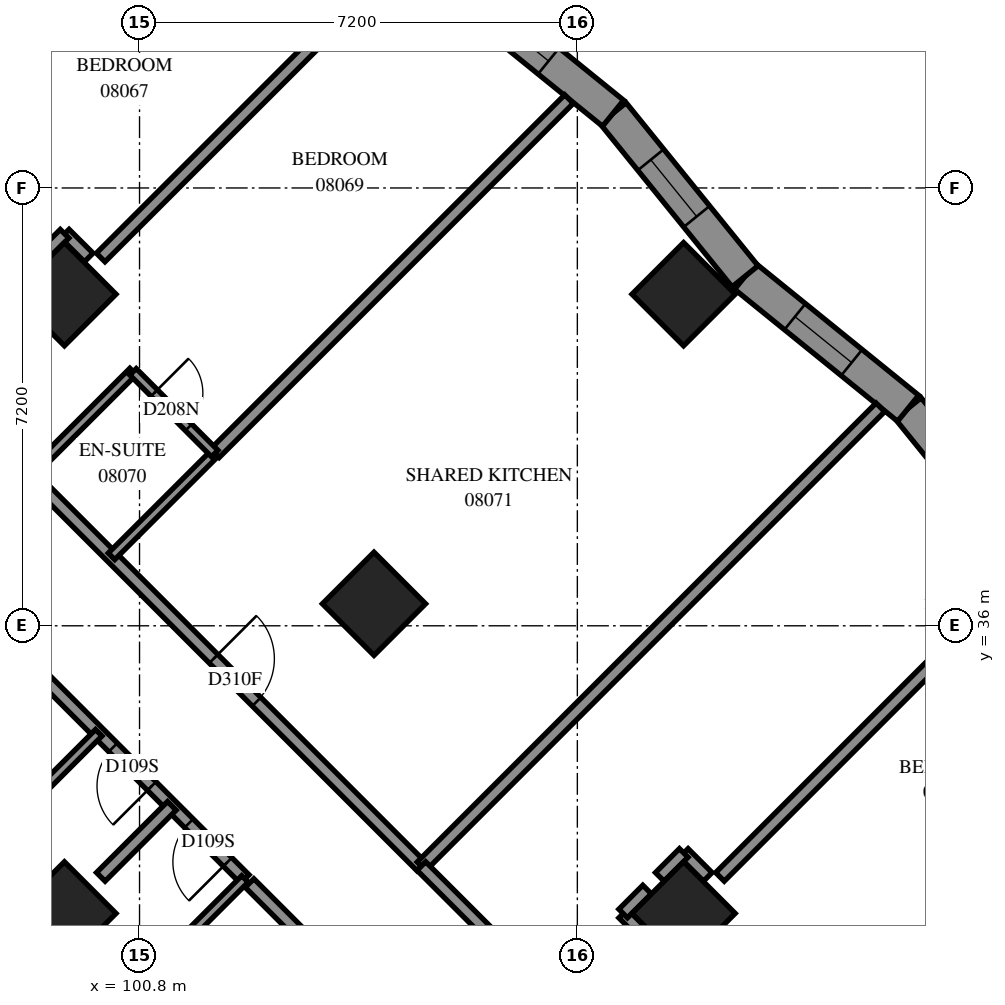
"""IFC4 building model, lengths in metres.
Left out: names, types, materials, properties, quantities, classifications, styles, units other than length and angle.
Written with IfcOpenShell. Run it as: python <this file> out.ifc"""

import sys

from ifc_helpers import new_model, si_unit, direction, frame, frame_2d, origin, origin_2d, place, context, subcontext, project, spatial, polyline, rectangle, outline, extrude, element, fill, save


model = new_model("IFC4")
c1 = context("Model", 3, precision=1e-05, world=origin(), true_north=direction((0.0, 1.0)))
c2 = subcontext(c1, "Body", "Model", "MODEL_VIEW")
j1 = project(units=[si_unit("LENGTHUNIT", "METRE"), si_unit("PLANEANGLEUNIT", "RADIAN")], contexts=[c1])
p1 = place(None, origin())
s1 = spatial("IfcSite", under=j1, at=p1, CompositionType="ELEMENT")
p2 = place(p1, origin())
s2 = spatial("IfcBuilding", under=s1, at=p2, CompositionType="ELEMENT")
p3 = place(p2, frame((0.0, 0.0, 33.8)))
s3 = spatial("IfcBuildingStorey", under=s2, at=p3, CompositionType="ELEMENT", Elevation=33.8)
for number, where, z_axis, x_axis in (
    (1, (99.565, 41.453, 0.0), (0.0, 0.0, 1.0), (0.707, -0.707, 0.0)),
    (2, (109.747, 41.453, 0.0), (0.0, 0.0, 1.0), (0.707, -0.707, 0.0)),
    (3, (104.656, 36.362, 0.0), (0.0, 0.0, 1.0), (0.707, -0.707, 0.0)),
    (4, (99.565, 31.271, 0.0), (0.0, 0.0, 1.0), (0.707, -0.707, 0.0)),
    (5, (109.747, 31.271, 0.0), (0.0, 0.0, 1.0), (0.707, -0.707, 0.0)),
):
    element("IfcColumn", number, at=place(p3, frame(where, z_axis=z_axis, x_axis=x_axis)), inside=s3, PredefinedType="COLUMN", context=c2, shape_type="SweptSolid", body=[
        extrude(rectangle(XDim=1.2, YDim=1.2, at=origin_2d()), origin(), (0.0, 0.0, 1.0), 3.1),
    ])
p4 = place(p3, frame((115.626, 36.877, 0.0), z_axis=(0.0, 0.0, 1.0), x_axis=(-0.6292379801, 0.7772126893, 0.0)))
e6 = element("IfcWall", 6, at=p4, inside=s3, PredefinedType="SOLIDWALL", context=c2, shape_type="SweptSolid", body=[
    extrude(outline(polyline([(0.053, -0.275), (3.502, -0.275), (3.445, 0.275), (-0.053, 0.275), (0.053, -0.275)])), origin(), (0.0, 0.0, 1.0), 3.1),
])
p5 = place(p4, frame((1.122, 0.0, 0.5)))
e7 = element("IfcOpeningElement", 7, at=p5, cuts=e6, PredefinedType="OPENING", context=c2, shape_type="SweptSolid", body=[
    extrude(rectangle(XDim=1.2, YDim=2.45, at=frame_2d((0.6, 1.225))), frame((0.0, 0.285, 0.0), z_axis=(0.0, -1.0, 0.0), x_axis=(1.0, 0.0, 0.0)), (0.0, 0.0, 1.0), 0.57),
])
p6 = place(p3, frame((113.44, 39.577, 0.0), z_axis=(0.0, 0.0, 1.0), x_axis=(-0.7772131435, 0.6292374191, 0.0)))
e8 = element("IfcWall", 8, at=p6, inside=s3, PredefinedType="SOLIDWALL", context=c2, shape_type="SweptSolid", body=[
    extrude(outline(polyline([(-0.029, -0.275), (3.421, -0.275), (3.479, 0.275), (0.029, 0.275), (-0.029, -0.275)])), origin(), (0.0, 0.0, 1.0), 3.1),
])
p7 = place(p6, frame((1.195, 0.0, 0.5)))
e9 = element("IfcOpeningElement", 9, at=p7, cuts=e8, PredefinedType="OPENING", context=c2, shape_type="SweptSolid", body=[
    extrude(rectangle(XDim=1.2, YDim=2.45, at=frame_2d((0.6, 1.225))), frame((0.0, 0.285, 0.0), z_axis=(0.0, -1.0, 0.0), x_axis=(1.0, 0.0, 0.0)), (0.0, 0.0, 1.0), 0.57),
])
p8 = place(p3, frame((110.759, 41.747, 0.0), z_axis=(0.0, 0.0, 1.0), x_axis=(-0.6292199091, 0.7772273194, 0.0)))
e10 = element("IfcWall", 10, at=p8, inside=s3, PredefinedType="SOLIDWALL", context=c2, shape_type="SweptSolid", body=[
    extrude(outline(polyline([(0.029, -0.275), (3.479, -0.275), (3.421, 0.275), (-0.029, 0.275), (0.029, -0.275)])), origin(), (0.0, 0.0, 1.0), 3.1),
])
p9 = place(p8, frame((1.265, 0.0, 0.5)))
e11 = element("IfcOpeningElement", 11, at=p9, cuts=e10, PredefinedType="OPENING", context=c2, shape_type="SweptSolid", body=[
    extrude(rectangle(XDim=1.2, YDim=2.45, at=frame_2d((0.6, 1.225))), frame((0.0, 0.285, 0.0), z_axis=(0.0, -1.0, 0.0), x_axis=(1.0, 0.0, 0.0)), (0.0, 0.0, 1.0), 0.57),
])
p10 = place(p3, frame((108.588, 44.429, 0.0), z_axis=(0.0, 0.0, 1.0), x_axis=(-0.7772131435, 0.6292374191, 0.0)))
e12 = element("IfcWall", 12, at=p10, inside=s3, PredefinedType="SOLIDWALL", context=c2, shape_type="SweptSolid", body=[
    extrude(outline(polyline([(-0.029, -0.275), (3.421, -0.275), (3.479, 0.275), (0.029, 0.275), (-0.029, -0.275)])), origin(), (0.0, 0.0, 1.0), 3.1),
])
p11 = place(p10, frame((1.365, 0.0, 0.5)))
e13 = element("IfcOpeningElement", 13, at=p11, cuts=e12, PredefinedType="OPENING", context=c2, shape_type="SweptSolid", body=[
    extrude(rectangle(XDim=1.2, YDim=2.45, at=frame_2d((0.6, 1.225))), frame((0.0, 0.285, 0.0), z_axis=(0.0, -1.0, 0.0), x_axis=(1.0, 0.0, 0.0)), (0.0, 0.0, 1.0), 0.57),
])
p12 = place(p3, frame((94.895, 42.581, 0.0), z_axis=(0.0, 0.0, 1.0), x_axis=(0.7071067812, -0.7071067812, 0.0)))
e14 = element("IfcWall", 14, at=p12, inside=s3, PredefinedType="PARTITIONING", context=c2, shape_type="SweptSolid", body=[
    extrude(rectangle(XDim=14.9, YDim=0.2, at=frame_2d((7.45, 0.0))), origin(), (0.0, 0.0, 1.0), 3.1),
])
p13 = place(p12, frame((2.8, 0.0, 0.0)))
e15 = element("IfcOpeningElement", 15, at=p13, cuts=e14, PredefinedType="OPENING", context=c2, shape_type="SweptSolid", body=[
    extrude(rectangle(XDim=0.9, YDim=2.1, at=frame_2d((0.45, 1.05))), frame((0.0, 0.11, 0.0), z_axis=(0.0, -1.0, 0.0), x_axis=(1.0, 0.0, 0.0)), (0.0, 0.0, 1.0), 0.22),
])
p14 = place(p12, frame((4.348, 0.0, 0.0)))
e16 = element("IfcOpeningElement", 16, at=p14, cuts=e14, PredefinedType="OPENING", context=c2, shape_type="SweptSolid", body=[
    extrude(rectangle(XDim=0.9, YDim=2.1, at=frame_2d((0.45, 1.05))), frame((0.0, 0.11, 0.0), z_axis=(0.0, -1.0, 0.0), x_axis=(1.0, 0.0, 0.0)), (0.0, 0.0, 1.0), 0.22),
])
p15 = place(p12, frame((10.073, 0.0, 0.0)))
e17 = element("IfcOpeningElement", 17, at=p15, cuts=e14, PredefinedType="OPENING", context=c2, shape_type="SweptSolid", body=[
    extrude(rectangle(XDim=1.0, YDim=2.1, at=frame_2d((0.5, 1.05))), frame((0.0, 0.11, 0.0), z_axis=(0.0, -1.0, 0.0), x_axis=(1.0, 0.0, 0.0)), (0.0, 0.0, 1.0), 0.22),
])
p16 = place(p3, frame((102.609, 31.769, 0.0), z_axis=(0.0, 0.0, 1.0), x_axis=(0.7071067812, -0.7071067812, 0.0)))
e18 = element("IfcWall", 18, at=p16, inside=s3, PredefinedType="PARTITIONING", context=c2, shape_type="SweptSolid", body=[
    extrude(rectangle(XDim=10.723, YDim=0.2, at=frame_2d((5.361, 0.0))), origin(), (0.0, 0.0, 1.0), 3.1),
])
p17 = place(p16, frame((4.15, 0.0, 0.0)))
e19 = element("IfcOpeningElement", 19, at=p17, cuts=e18, PredefinedType="OPENING", context=c2, shape_type="SweptSolid", body=[
    extrude(rectangle(XDim=0.9, YDim=2.1, at=frame_2d((0.45, 1.05))), frame((0.0, 0.11, 0.0), z_axis=(0.0, -1.0, 0.0), x_axis=(1.0, 0.0, 0.0)), (0.0, 0.0, 1.0), 0.22),
])
p18 = place(p16, frame((5.8, 0.0, 0.0)))
e20 = element("IfcOpeningElement", 20, at=p18, cuts=e18, PredefinedType="OPENING", context=c2, shape_type="SweptSolid", body=[
    extrude(rectangle(XDim=0.9, YDim=2.1, at=frame_2d((0.45, 1.05))), frame((0.0, 0.11, 0.0), z_axis=(0.0, -1.0, 0.0), x_axis=(1.0, 0.0, 0.0)), (0.0, 0.0, 1.0), 0.22),
])
p19 = place(p3, frame((105.437, 32.045, 0.0), z_axis=(0.0, 0.0, 1.0), x_axis=(0.70701308, 0.70720047, 0.0)))
e21 = element("IfcWall", 21, at=p19, inside=s3, PredefinedType="PARTITIONING", context=c2, shape_type="SweptSolid", body=[
    extrude(rectangle(XDim=10.673, YDim=0.2, at=frame_2d((5.337, 0.0))), origin(), (0.0, 0.0, 1.0), 3.1),
])
p20 = place(p3, frame((94.901, 42.583, 0.0), z_axis=(0.0, 0.0, 1.0), x_axis=(0.7072154749, 0.7069980708, 0.0)))
e22 = element("IfcWall", 22, at=p20, inside=s3, PredefinedType="PARTITIONING", context=c2, shape_type="SweptSolid", body=[
    extrude(rectangle(XDim=9.2, YDim=0.2, at=frame_2d((4.6, 0.0))), origin(), (0.0, 0.0, 1.0), 3.1),
])
p21 = place(p3, frame((102.039, 38.837, 0.0), z_axis=(0.0, 0.0, 1.0), x_axis=(0.7071067812, 0.7071067812, 0.0)))
e23 = element("IfcWall", 23, at=p21, inside=s3, PredefinedType="PARTITIONING", context=c2, shape_type="SweptSolid", body=[
    extrude(rectangle(XDim=8.237, YDim=0.2, at=frame_2d((4.119, 0.0))), origin(), (0.0, 0.0, 1.0), 3.1),
])
p22 = place(p3, frame((96.947, 43.929, 0.0), z_axis=(0.0, 0.0, 1.0), x_axis=(0.7071067812, 0.7071067812, 0.0)))
e24 = element("IfcWall", 24, at=p22, inside=s3, PredefinedType="PARTITIONING", context=c2, shape_type="SweptSolid", body=[
    extrude(rectangle(XDim=8.201, YDim=0.2, at=frame_2d((4.101, 0.0))), origin(), (0.0, 0.0, 1.0), 3.1),
])
p23 = place(p3, frame((102.531, 31.833, 0.0), z_axis=(0.0, 0.0, 1.0), x_axis=(-0.7070095491, 0.7072039999, 0.0)))
e25 = element("IfcWall", 25, at=p23, inside=s3, PredefinedType="PARTITIONING", context=c2, shape_type="SweptSolid", body=[
    extrude(rectangle(XDim=7.2, YDim=0.2, at=frame_2d((3.6, 0.0))), origin(), (0.0, 0.0, 1.0), 3.1),
])
p24 = place(p23, frame((2.165, 0.0, 0.0)))
e26 = element("IfcOpeningElement", 26, at=p24, cuts=e25, PredefinedType="OPENING", context=c2, shape_type="SweptSolid", body=[
    extrude(rectangle(XDim=0.9, YDim=2.1, at=frame_2d((0.45, 1.05))), frame((0.0, 0.11, 0.0), z_axis=(0.0, -1.0, 0.0), x_axis=(1.0, 0.0, 0.0)), (0.0, 0.0, 1.0), 0.22),
])
p25 = place(p23, frame((0.4, 0.0, 0.0)))
e27 = element("IfcOpeningElement", 27, at=p25, cuts=e25, PredefinedType="OPENING", context=c2, shape_type="SweptSolid", body=[
    extrude(rectangle(XDim=0.9, YDim=2.1, at=frame_2d((0.45, 1.05))), frame((0.0, 0.11, 0.0), z_axis=(0.0, -1.0, 0.0), x_axis=(1.0, 0.0, 0.0)), (0.0, 0.0, 1.0), 0.22),
])
p26 = place(p3, frame((110.345, 31.871, 0.0), z_axis=(0.0, 0.0, 1.0), x_axis=(0.7071067812, 0.7071067812, 0.0)))
e28 = element("IfcWall", 28, at=p26, inside=s3, PredefinedType="PARTITIONING", context=c2, shape_type="SweptSolid", body=[
    extrude(rectangle(XDim=5.504, YDim=0.2, at=frame_2d((2.752, 0.0))), origin(), (0.0, 0.0, 1.0), 3.1),
])
p27 = place(p3, frame((100.161, 42.057, 0.0), z_axis=(0.0, 0.0, 1.0), x_axis=(0.7072884866, 0.706925029, 0.0)))
e29 = element("IfcWall", 29, at=p27, inside=s3, PredefinedType="PARTITIONING", context=c2, shape_type="SweptSolid", body=[
    extrude(rectangle(XDim=5.503, YDim=0.2, at=frame_2d((2.751, 0.0))), origin(), (0.0, 0.0, 1.0), 3.1),
])
p28 = place(p3, frame((105.435, 32.049, 0.0), z_axis=(0.0, 0.0, 1.0), x_axis=(0.7074545101, -0.7067588812, 0.0)))
e30 = element("IfcWall", 30, at=p28, inside=s3, PredefinedType="PARTITIONING", context=c2, shape_type="SweptSolid", body=[
    extrude(rectangle(XDim=2.875, YDim=0.2, at=frame_2d((1.438, 0.0))), origin(), (0.0, 0.0, 1.0), 3.1),
])
for number, where, z_axis, x_axis in (
    (31, (100.34, 37.142, 0.0), (0.0, 0.0, 1.0), (0.708, 0.707, 0.0)),
    (32, (98.996, 38.486, 0.0), (0.0, 0.0, 1.0), (0.708, 0.707, 0.0)),
):
    element("IfcWall", number, at=place(p3, frame(where, z_axis=z_axis, x_axis=x_axis)), inside=s3, PredefinedType="PARTITIONING", context=c2, shape_type="SweptSolid", body=[
        extrude(rectangle(XDim=2.4, YDim=0.15, at=frame_2d((1.2, 0.0))), origin(), (0.0, 0.0, 1.0), 3.1),
    ])
for number, where, z_axis, x_axis in (
    (33, (100.837, 30.141, 0.0), (0.0, 0.0, 1.0), (0.707, 0.707, 0.0)),
    (34, (98.433, 32.545, 0.0), (0.0, 0.0, 1.0), (0.707, 0.707, 0.0)),
):
    element("IfcWall", number, at=place(p3, frame(where, z_axis=z_axis, x_axis=x_axis)), inside=s3, PredefinedType="PARTITIONING", context=c2, shape_type="SweptSolid", body=[
        extrude(rectangle(XDim=2.398, YDim=0.15, at=frame_2d((1.199, 0.0))), origin(), (0.0, 0.0, 1.0), 3.1),
    ])
p29 = place(p3, frame((100.693, 40.177, 0.0), z_axis=(0.0, 0.0, 1.0), x_axis=(0.7071067812, -0.7071067812, 0.0)))
e35 = element("IfcWall", 35, at=p29, inside=s3, PredefinedType="PARTITIONING", context=c2, shape_type="SweptSolid", body=[
    extrude(rectangle(XDim=1.901, YDim=0.15, at=frame_2d((0.95, 0.0))), origin(), (0.0, 0.0, 1.0), 3.1),
])
p30 = place(p29, frame((0.493, 0.0, 0.0)))
e36 = element("IfcOpeningElement", 36, at=p30, cuts=e35, PredefinedType="OPENING", context=c2, shape_type="SweptSolid", body=[
    extrude(rectangle(XDim=0.8, YDim=2.1, at=frame_2d((0.4, 1.05))), frame((0.0, 0.085, 0.0), z_axis=(0.0, -1.0, 0.0), x_axis=(1.0, 0.0, 0.0)), (0.0, 0.0, 1.0), 0.17),
])
p31 = place(p3, frame((100.163, 31.871, 0.0), z_axis=(0.0, 0.0, 1.0), x_axis=(0.7071067812, 0.7071067812, 0.0)))
e37 = element("IfcWall", 37, at=p31, inside=s3, PredefinedType="PARTITIONING", context=c2, shape_type="SweptSolid", body=[
    extrude(rectangle(XDim=1.652, YDim=0.2, at=frame_2d((0.826, 0.0))), origin(), (0.0, 0.0, 1.0), 3.1),
])
for number, where, z_axis, x_axis in (
    (38, (108.754, 31.268, 0.0), (0.0, 0.0, 1.0), (0.707, -0.707, 0.0)),
    (39, (109.751, 32.265, 0.0), (0.0, 0.0, 1.0), (0.707, -0.707, 0.0)),
    (40, (109.355, 31.871, 0.0), (0.0, 0.0, 1.0), (0.707, 0.707, 0.0)),
    (41, (108.753, 31.269, 0.0), (0.0, 0.0, 1.0), (0.707, 0.707, 0.0)),
):
    element("IfcWall", number, at=place(p3, frame(where, z_axis=z_axis, x_axis=x_axis)), inside=s3, PredefinedType="PARTITIONING", context=c2, shape_type="SweptSolid", body=[
        extrude(rectangle(XDim=0.557, YDim=0.2, at=frame_2d((0.279, 0.0))), origin(), (0.0, 0.0, 1.0), 3.1),
    ])
p32 = place(p3, frame((99.571, 42.449, 0.0), z_axis=(0.0, 0.0, 1.0), x_axis=(0.7089037401, -0.705305244, 0.0)))
e42 = element("IfcWall", 42, at=p32, inside=s3, PredefinedType="PARTITIONING", context=c2, shape_type="SweptSolid", body=[
    extrude(rectangle(XDim=0.556, YDim=0.2, at=frame_2d((0.278, 0.0))), origin(), (0.0, 0.0, 1.0), 3.1),
])
p33 = place(p3, frame((99.175, 42.055, 0.0), z_axis=(0.0, 0.0, 1.0), x_axis=(0.7071067812, 0.7071067812, 0.0)))
e43 = element("IfcWall", 43, at=p33, inside=s3, PredefinedType="PARTITIONING", context=c2, shape_type="SweptSolid", body=[
    extrude(rectangle(XDim=0.554, YDim=0.2, at=frame_2d((0.277, 0.0))), origin(), (0.0, 0.0, 1.0), 3.1),
])
p34 = place(p7, origin())
e44 = element("IfcWindow", 44, at=p34, inside=s3, PartitioningType="SINGLE_PANEL", PredefinedType="WINDOW", context=c2, shape_type="SweptSolid", body=[
    extrude(rectangle(XDim=1.2, YDim=2.45, at=frame_2d((0.6, 1.225))), frame((0.0, 0.155, 0.0), z_axis=(0.0, -1.0, 0.0), x_axis=(1.0, 0.0, 0.0)), (0.0, 0.0, 1.0), 0.06),
])
fill(e9, e44)
p35 = place(p9, origin())
e45 = element("IfcWindow", 45, at=p35, inside=s3, PartitioningType="SINGLE_PANEL", PredefinedType="WINDOW", context=c2, shape_type="SweptSolid", body=[
    extrude(rectangle(XDim=1.2, YDim=2.45, at=frame_2d((0.6, 1.225))), frame((0.0, 0.155, 0.0), z_axis=(0.0, -1.0, 0.0), x_axis=(1.0, 0.0, 0.0)), (0.0, 0.0, 1.0), 0.06),
])
fill(e11, e45)
p36 = place(p11, origin())
e46 = element("IfcWindow", 46, at=p36, inside=s3, PartitioningType="SINGLE_PANEL", PredefinedType="WINDOW", context=c2, shape_type="SweptSolid", body=[
    extrude(rectangle(XDim=1.2, YDim=2.45, at=frame_2d((0.6, 1.225))), frame((0.0, 0.155, 0.0), z_axis=(0.0, -1.0, 0.0), x_axis=(1.0, 0.0, 0.0)), (0.0, 0.0, 1.0), 0.06),
])
fill(e13, e46)
p37 = place(p30, origin())
e47 = element("IfcDoor", 47, at=p37, inside=s3, OperationType="SINGLE_SWING_RIGHT", PredefinedType="DOOR", context=c2, shape_type="SweptSolid", body=[
    extrude(rectangle(XDim=0.8, YDim=2.1, at=frame_2d((0.4, 1.05))), frame((0.0, 0.025, 0.0), z_axis=(0.0, -1.0, 0.0), x_axis=(1.0, 0.0, 0.0)), (0.0, 0.0, 1.0), 0.05),
])
fill(e36, e47)
p38 = place(p15, origin())
e48 = element("IfcDoor", 48, at=p38, inside=s3, OperationType="SINGLE_SWING_RIGHT", PredefinedType="DOOR", context=c2, shape_type="SweptSolid", body=[
    extrude(rectangle(XDim=1.0, YDim=2.1, at=frame_2d((0.5, 1.05))), frame((0.0, 0.025, 0.0), z_axis=(0.0, -1.0, 0.0), x_axis=(1.0, 0.0, 0.0)), (0.0, 0.0, 1.0), 0.05),
])
fill(e17, e48)
p39 = place(p24, origin())
e49 = element("IfcDoor", 49, at=p39, inside=s3, OperationType="SINGLE_SWING_LEFT", PredefinedType="DOOR", context=c2, shape_type="SweptSolid", body=[
    extrude(rectangle(XDim=0.9, YDim=2.1, at=frame_2d((0.45, 1.05))), frame((0.0, 0.025, 0.0), z_axis=(0.0, -1.0, 0.0), x_axis=(1.0, 0.0, 0.0)), (0.0, 0.0, 1.0), 0.05),
])
fill(e26, e49)
p40 = place(p25, origin())
e50 = element("IfcDoor", 50, at=p40, inside=s3, OperationType="SINGLE_SWING_RIGHT", PredefinedType="DOOR", context=c2, shape_type="SweptSolid", body=[
    extrude(rectangle(XDim=0.9, YDim=2.1, at=frame_2d((0.45, 1.05))), frame((0.0, 0.025, 0.0), z_axis=(0.0, -1.0, 0.0), x_axis=(1.0, 0.0, 0.0)), (0.0, 0.0, 1.0), 0.05),
])
fill(e27, e50)
save(model, sys.argv[1])
